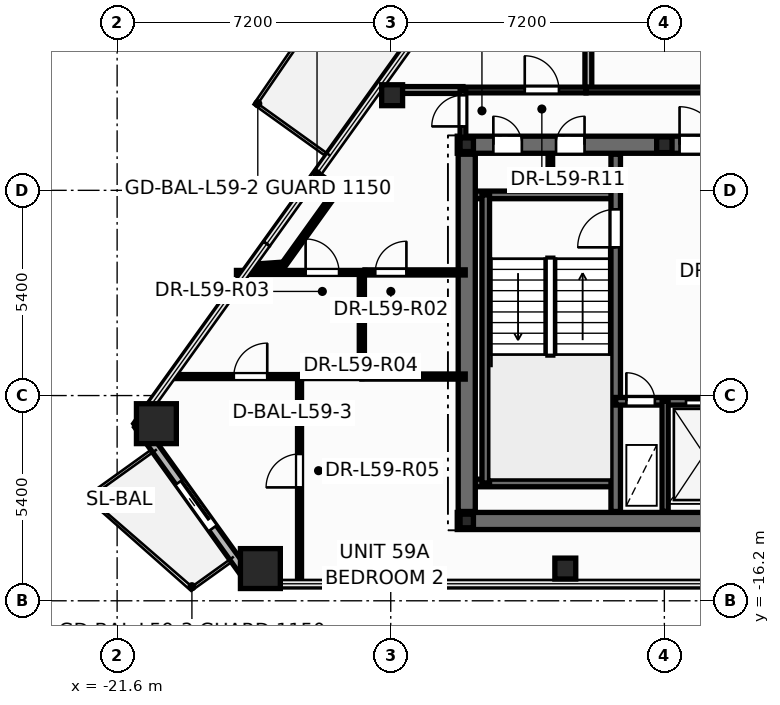
"""IFC4 building model, lengths in metres.
Left out: names, types, materials, properties, quantities, classifications, styles, units other than length and angle.
Written with IfcOpenShell. Run it as: python <this file> out.ifc"""

import sys

from ifc_helpers import new_model, si_unit, direction, frame, frame_2d, origin, origin_2d, place, context, subcontext, project, spatial, rectangle, hollow_rectangle, hollow_circle, i_section, extrude, element, fill, save


model = new_model("IFC4")
c1 = context("Model", 3, precision=1e-05, world=origin(), true_north=direction((0.0, 1.0)))
c2 = subcontext(c1, "Body", "Model", "MODEL_VIEW")
j1 = project(units=[si_unit("LENGTHUNIT", "METRE"), si_unit("PLANEANGLEUNIT", "RADIAN")], contexts=[c1])
p1 = place(None, origin())
s1 = spatial("IfcSite", under=j1, at=p1, CompositionType="ELEMENT")
p2 = place(p1, origin())
s2 = spatial("IfcBuilding", under=s1, at=p2, CompositionType="ELEMENT")
p3 = place(p2, frame((0.0, 0.0, 225.3)))
s3 = spatial("IfcBuildingStorey", under=s2, at=p3, CompositionType="ELEMENT", Elevation=225.3)
for number, where, z_axis, x_axis in (
    (1, (-20.567, -11.54, 0.0), (0.0, 0.0, 1.0), (1.0, 0.0, 0.0)),
    (2, (-17.83, -15.352, 0.0), (0.0, 0.0, 1.0), (1.0, 0.0, 0.0)),
):
    element("IfcColumn", number, at=place(p3, frame(where, z_axis=z_axis, x_axis=x_axis)), inside=s3, PredefinedType="COLUMN", context=c2, shape_type="SweptSolid", body=[
        extrude(hollow_rectangle(XDim=1.05, YDim=1.05, WallThickness=0.045, at=origin_2d()), origin(), (0.0, 0.0, 1.0), 3.6),
    ])
for number, where, z_axis, x_axis in (
    (3, (-9.807, -15.352, 0.0), (0.0, 0.0, 1.0), (1.0, 0.0, 0.0)),
    (4, (-14.363, -2.897, 0.0), (0.0, 0.0, 1.0), (1.0, 0.0, 0.0)),
):
    element("IfcColumn", number, at=place(p3, frame(where, z_axis=z_axis, x_axis=x_axis)), inside=s3, PredefinedType="COLUMN", context=c2, shape_type="SweptSolid", body=[
        extrude(hollow_circle(Radius=0.275, WallThickness=0.024, at=origin_2d()), origin(), (0.0, 0.0, 1.0), 3.6),
    ])
for number, where, z_axis, x_axis in (
    (5, (-12.4, -14.1, 0.0), (0.0, 0.0, 1.0), (1.0, 0.0, 0.0)),
    (6, (-12.4, -4.2, 0.0), (0.0, 0.0, 1.0), (1.0, 0.0, 0.0)),
):
    element("IfcColumn", number, at=place(p3, frame(where, z_axis=z_axis, x_axis=x_axis)), inside=s3, PredefinedType="COLUMN", context=c2, shape_type="SweptSolid", body=[
        extrude(i_section(OverallWidth=0.352, OverallDepth=0.359, WebThickness=0.018, FlangeThickness=0.026, at=origin_2d()), origin(), (0.0, 0.0, 1.0), 3.6),
    ])
p4 = place(p3, frame((-7.2, -4.2, 0.0), z_axis=(0.0, 0.0, 1.0), x_axis=(1.0, 0.0, 0.0)))
e7 = element("IfcColumn", 7, at=p4, inside=s3, PredefinedType="PILASTER", context=c2, shape_type="SweptSolid", body=[
    extrude(i_section(OverallWidth=0.405, OverallDepth=0.414, WebThickness=0.022, FlangeThickness=0.032, at=origin_2d()), origin(), (0.0, 0.0, 1.0), 3.6),
])
p5 = place(p3, frame((-21.036, -11.572, -0.015), z_axis=(0.0, 0.0, 1.0), x_axis=(0.583136392473, -0.812374265824, 0.0)))
e8 = element("IfcWall", 8, at=p5, inside=s3, PredefinedType="STANDARD", context=c2, shape_type="SweptSolid", body=[
    extrude(rectangle(XDim=5.106, YDim=0.24, at=frame_2d((2.553, 0.0))), origin(), (0.0, 0.0, 1.0), 2.853),
])
p6 = place(p5, frame((1.846, 0.0, 0.015)))
e9 = element("IfcOpeningElement", 9, at=p6, cuts=e8, PredefinedType="OPENING", context=c2, shape_type="SweptSolid", body=[
    extrude(rectangle(XDim=1.506, YDim=2.204, at=frame_2d((0.75, 1.102))), frame((0.0, 0.13, 0.0), z_axis=(0.0, -1.0, 0.0), x_axis=(1.0, 0.0, 0.0)), (0.0, 0.0, 1.0), 0.26),
])
p7 = place(p3, frame((-10.2, -5.52, 0.0), z_axis=(0.0, 0.0, 1.0), x_axis=(0.0, 1.0, 0.0)))
e10 = element("IfcWall", 10, at=p7, inside=s3, PredefinedType="PARTITIONING", context=c2, shape_type="SweptSolid", body=[
    extrude(rectangle(XDim=1.12, YDim=0.12, at=frame_2d((0.56, 0.0))), origin(), (0.0, 0.0, 1.0), 3.32),
])
p8 = place(p3, frame((-12.65, -14.1, 0.0), z_axis=(0.0, 0.0, 1.0), x_axis=(1.0, 0.0, 0.0)))
e11 = element("IfcWall", 11, at=p8, inside=s3, PredefinedType="SHEAR", context=c2, shape_type="SweptSolid", body=[
    extrude(rectangle(XDim=25.3, YDim=0.45, at=frame_2d((12.65, 0.0))), origin(), (0.0, 0.0, 1.0), 3.6),
])
p9 = place(p3, frame((-12.65, -4.2, 0.0), z_axis=(0.0, 0.0, 1.0), x_axis=(1.0, 0.0, 0.0)))
e12 = element("IfcWall", 12, at=p9, inside=s3, PredefinedType="SHEAR", context=c2, shape_type="SweptSolid", body=[
    extrude(rectangle(XDim=25.3, YDim=0.45, at=frame_2d((12.65, 0.0))), origin(), (0.0, 0.0, 1.0), 3.6),
])
p10 = place(p9, frame((0.95, 0.0, 0.0)))
e13 = element("IfcOpeningElement", 13, at=p10, cuts=e12, PredefinedType="OPENING", context=c2, shape_type="SweptSolid", body=[
    extrude(rectangle(XDim=0.756, YDim=2.054, at=frame_2d((0.375, 1.027))), frame((0.0, 0.235, 0.0), z_axis=(0.0, -1.0, 0.0), x_axis=(1.0, 0.0, 0.0)), (0.0, 0.0, 1.0), 0.47),
])
p11 = place(p9, frame((2.6, 0.0, 0.0)))
e14 = element("IfcOpeningElement", 14, at=p11, cuts=e12, PredefinedType="OPENING", context=c2, shape_type="SweptSolid", body=[
    extrude(rectangle(XDim=0.756, YDim=2.054, at=frame_2d((0.375, 1.027))), frame((0.0, 0.235, 0.0), z_axis=(0.0, -1.0, 0.0), x_axis=(1.0, 0.0, 0.0)), (0.0, 0.0, 1.0), 0.47),
])
p12 = place(p9, frame((21.85, 0.0, 0.0)))
e15 = element("IfcOpeningElement", 15, at=p12, cuts=e12, PredefinedType="OPENING", context=c2, shape_type="SweptSolid", body=[
    extrude(rectangle(XDim=0.756, YDim=2.054, at=frame_2d((0.375, 1.027))), frame((0.0, 0.235, 0.0), z_axis=(0.0, -1.0, 0.0), x_axis=(1.0, 0.0, 0.0)), (0.0, 0.0, 1.0), 0.47),
])
p13 = place(p9, frame((23.5, 0.0, 0.0)))
e16 = element("IfcOpeningElement", 16, at=p13, cuts=e12, PredefinedType="OPENING", context=c2, shape_type="SweptSolid", body=[
    extrude(rectangle(XDim=0.756, YDim=2.054, at=frame_2d((0.375, 1.027))), frame((0.0, 0.235, 0.0), z_axis=(0.0, -1.0, 0.0), x_axis=(1.0, 0.0, 0.0)), (0.0, 0.0, 1.0), 0.47),
])
p14 = place(p9, frame((5.85, 0.0, 0.0)))
e17 = element("IfcOpeningElement", 17, at=p14, cuts=e12, PredefinedType="OPENING", context=c2, shape_type="SweptSolid", body=[
    extrude(rectangle(XDim=1.006, YDim=2.104, at=frame_2d((0.5, 1.052))), frame((0.0, 0.235, 0.0), z_axis=(0.0, -1.0, 0.0), x_axis=(1.0, 0.0, 0.0)), (0.0, 0.0, 1.0), 0.47),
])
p15 = place(p9, frame((10.35, 0.0, 0.0)))
e18 = element("IfcOpeningElement", 18, at=p15, cuts=e12, PredefinedType="OPENING", context=c2, shape_type="SweptSolid", body=[
    extrude(rectangle(XDim=1.406, YDim=2.154, at=frame_2d((0.7, 1.077))), frame((0.0, 0.235, 0.0), z_axis=(0.0, -1.0, 0.0), x_axis=(1.0, 0.0, 0.0)), (0.0, 0.0, 1.0), 0.47),
])
p16 = place(p9, frame((18.45, 0.0, 0.0)))
e19 = element("IfcOpeningElement", 19, at=p16, cuts=e12, PredefinedType="OPENING", context=c2, shape_type="SweptSolid", body=[
    extrude(rectangle(XDim=1.006, YDim=2.104, at=frame_2d((0.5, 1.052))), frame((0.0, 0.235, 0.0), z_axis=(0.0, -1.0, 0.0), x_axis=(1.0, 0.0, 0.0)), (0.0, 0.0, 1.0), 0.47),
])
for number, where, z_axis, x_axis in (
    (20, (-12.35, -5.52, 0.0), (0.0, 0.0, 1.0), (1.0, 0.0, 0.0)),
    (21, (-12.35, -13.1, 0.0), (0.0, 0.0, 1.0), (1.0, 0.0, 0.0)),
):
    element("IfcWall", number, at=place(p3, frame(where, z_axis=z_axis, x_axis=x_axis)), inside=s3, PredefinedType="SOLIDWALL", context=c2, shape_type="SweptSolid", body=[
        extrude(rectangle(XDim=3.87, YDim=0.2, at=frame_2d((1.935, 0.0))), origin(), (0.0, 0.0, 1.0), 3.6),
    ])
p17 = place(p3, frame((-11.9, -13.1, 0.0), z_axis=(0.0, 0.0, 1.0), x_axis=(0.0, 1.0, 0.0)))
e22 = element("IfcWall", 22, at=p17, inside=s3, PredefinedType="SOLIDWALL", context=c2, shape_type="SweptSolid", body=[
    extrude(rectangle(XDim=7.58, YDim=0.2, at=frame_2d((3.79, 0.0))), origin(), (0.0, 0.0, 1.0), 3.6),
])
p18 = place(p3, frame((-8.48, -13.85, 0.0), z_axis=(0.0, 0.0, 1.0), x_axis=(0.0, 1.0, 0.0)))
e23 = element("IfcWall", 23, at=p18, inside=s3, PredefinedType="SHEAR", context=c2, shape_type="SweptSolid", body=[
    extrude(rectangle(XDim=9.4, YDim=0.25, at=frame_2d((4.7, 0.0))), origin(), (0.0, 0.0, 1.0), 3.6),
])
p19 = place(p18, frame((6.95, 0.0, 0.0)))
e24 = element("IfcOpeningElement", 24, at=p19, cuts=e23, PredefinedType="OPENING", context=c2, shape_type="SweptSolid", body=[
    extrude(rectangle(XDim=1.006, YDim=2.104, at=frame_2d((0.5, 1.052))), frame((0.0, 0.135, 0.0), z_axis=(0.0, -1.0, 0.0), x_axis=(1.0, 0.0, 0.0)), (0.0, 0.0, 1.0), 0.27),
])
p20 = place(p3, frame((-8.48, -10.95, 0.0), z_axis=(0.0, 0.0, 1.0), x_axis=(1.0, 0.0, 0.0)))
e25 = element("IfcWall", 25, at=p20, inside=s3, PredefinedType="SOLIDWALL", context=c2, shape_type="SweptSolid", body=[
    extrude(rectangle(XDim=3.36, YDim=0.2, at=frame_2d((1.68, 0.0))), origin(), (0.0, 0.0, 1.0), 3.6),
])
p21 = place(p20, frame((0.28, 0.0, 0.0)))
e26 = element("IfcOpeningElement", 26, at=p21, cuts=e25, PredefinedType="OPENING", context=c2, shape_type="SweptSolid", body=[
    extrude(rectangle(XDim=0.756, YDim=2.054, at=frame_2d((0.375, 1.027))), frame((0.0, 0.11, 0.0), z_axis=(0.0, -1.0, 0.0), x_axis=(1.0, 0.0, 0.0)), (0.0, 0.0, 1.0), 0.22),
])
p22 = place(p20, frame((1.85, 0.0, 0.0)))
e27 = element("IfcOpeningElement", 27, at=p22, cuts=e25, PredefinedType="OPENING", context=c2, shape_type="SweptSolid", body=[
    extrude(rectangle(XDim=1.106, YDim=2.104, at=frame_2d((0.55, 1.052))), frame((0.0, 0.11, 0.0), z_axis=(0.0, -1.0, 0.0), x_axis=(1.0, 0.0, 0.0)), (0.0, 0.0, 1.0), 0.22),
])
p23 = place(p3, frame((-7.18, -13.85, 0.0), z_axis=(0.0, 0.0, 1.0), x_axis=(0.0, 1.0, 0.0)))
e28 = element("IfcWall", 28, at=p23, inside=s3, PredefinedType="PARTITIONING", context=c2, shape_type="SweptSolid", body=[
    extrude(rectangle(XDim=2.9, YDim=0.16, at=frame_2d((1.45, 0.0))), origin(), (0.0, 0.0, 1.0), 2.545),
])
p24 = place(p3, frame((-12.4, -13.85, 0.0), z_axis=(0.0, 0.0, 1.0), x_axis=(0.0, 1.0, 0.0)))
e29 = element("IfcWall", 29, at=p24, inside=s3, PredefinedType="SHEAR", context=c2, shape_type="SweptSolid", body=[
    extrude(rectangle(XDim=9.4, YDim=0.45, at=frame_2d((4.7, 0.0))), origin(), (0.0, 0.0, 1.0), 3.6),
])
p25 = place(p3, frame((-9.2, -2.76, 0.0), z_axis=(0.0, 0.0, 1.0), x_axis=(0.0, 1.0, 0.0)))
e30 = element("IfcWall", 30, at=p25, inside=s3, PredefinedType="PARTITIONING", context=c2, shape_type="SweptSolid", body=[
    extrude(rectangle(XDim=7.742, YDim=0.18, at=frame_2d((3.871, 0.0))), origin(), (0.0, 0.0, 1.0), 2.595),
])
p26 = place(p3, frame((-16.8, -15.752, 0.0), z_axis=(0.0, 0.0, 1.0), x_axis=(0.0, 1.0, 0.0)))
e31 = element("IfcWall", 31, at=p26, inside=s3, PredefinedType="PARTITIONING", context=c2, shape_type="SweptSolid", body=[
    extrude(rectangle(XDim=5.452, YDim=0.105, at=frame_2d((2.726, 0.0))), origin(), (0.0, 0.0, 1.0), 2.838),
])
p27 = place(p26, frame((2.536, 0.0, 0.0)))
e32 = element("IfcOpeningElement", 32, at=p27, cuts=e31, PredefinedType="OPENING", context=c2, shape_type="SweptSolid", body=[
    extrude(rectangle(XDim=0.886, YDim=2.104, at=frame_2d((0.44, 1.052))), frame((0.0, 0.062, 0.0), z_axis=(0.0, -1.0, 0.0), x_axis=(1.0, 0.0, 0.0)), (0.0, 0.0, 1.0), 0.125),
])
p28 = place(p3, frame((-9.26, -2.76, 0.0), z_axis=(0.0, 0.0, 1.0), x_axis=(1.0, 0.0, 0.0)))
e33 = element("IfcWall", 33, at=p28, inside=s3, PredefinedType="PARTITIONING", context=c2, shape_type="SweptSolid", body=[
    extrude(rectangle(XDim=4.82, YDim=0.15, at=frame_2d((2.41, 0.0))), origin(), (0.0, 0.0, 1.0), 2.295),
])
p29 = place(p28, frame((3.52, 0.0, 0.0)))
e34 = element("IfcOpeningElement", 34, at=p29, cuts=e33, PredefinedType="OPENING", context=c2, shape_type="SweptSolid", body=[
    extrude(rectangle(XDim=0.906, YDim=2.104, at=frame_2d((0.45, 1.052))), frame((0.0, 0.085, 0.0), z_axis=(0.0, -1.0, 0.0), x_axis=(1.0, 0.0, 0.0)), (0.0, 0.0, 1.0), 0.17),
])
p30 = place(p3, frame((-20.169, -10.3, 0.0), z_axis=(0.0, 0.0, 1.0), x_axis=(1.0, 0.0, 0.0)))
e35 = element("IfcWall", 35, at=p30, inside=s3, PredefinedType="PARTITIONING", context=c2, shape_type="SweptSolid", body=[
    extrude(rectangle(XDim=3.429, YDim=0.105, at=frame_2d((1.715, 0.0))), origin(), (0.0, 0.0, 1.0), 2.295),
])
p31 = place(p30, frame((1.64, 0.0, 0.0)))
e36 = element("IfcOpeningElement", 36, at=p31, cuts=e35, PredefinedType="OPENING", context=c2, shape_type="SweptSolid", body=[
    extrude(rectangle(XDim=0.886, YDim=2.104, at=frame_2d((0.44, 1.052))), frame((0.0, 0.062, 0.0), z_axis=(0.0, -1.0, 0.0), x_axis=(1.0, 0.0, 0.0)), (0.0, 0.0, 1.0), 0.125),
])
p32 = place(p3, frame((-18.46, -7.56, 0.0), z_axis=(0.0, 0.0, 1.0), x_axis=(1.0, 0.0, 0.0)))
e37 = element("IfcWall", 37, at=p32, inside=s3, PredefinedType="PARTITIONING", context=c2, shape_type="SweptSolid", body=[
    extrude(rectangle(XDim=3.38, YDim=0.105, at=frame_2d((1.69, 0.0))), origin(), (0.0, 0.0, 1.0), 2.295),
])
p33 = place(p32, frame((1.82, 0.0, 0.0)))
e38 = element("IfcOpeningElement", 38, at=p33, cuts=e37, PredefinedType="OPENING", context=c2, shape_type="SweptSolid", body=[
    extrude(rectangle(XDim=0.886, YDim=2.104, at=frame_2d((0.44, 1.052))), frame((0.0, 0.062, 0.0), z_axis=(0.0, -1.0, 0.0), x_axis=(1.0, 0.0, 0.0)), (0.0, 0.0, 1.0), 0.125),
])
p34 = place(p3, frame((-12.5, -2.76, 0.0), z_axis=(0.0, 0.0, 1.0), x_axis=(1.0, 0.0, 0.0)))
e39 = element("IfcWall", 39, at=p34, inside=s3, PredefinedType="PARTITIONING", context=c2, shape_type="SweptSolid", body=[
    extrude(rectangle(XDim=3.238, YDim=0.15, at=frame_2d((1.619, 0.0))), origin(), (0.0, 0.0, 1.0), 3.32),
])
p35 = place(p34, frame((1.626, 0.0, 0.0)))
e40 = element("IfcOpeningElement", 40, at=p35, cuts=e39, PredefinedType="OPENING", context=c2, shape_type="SweptSolid", body=[
    extrude(rectangle(XDim=0.906, YDim=2.104, at=frame_2d((0.45, 1.052))), frame((0.0, 0.085, 0.0), z_axis=(0.0, -1.0, 0.0), x_axis=(1.0, 0.0, 0.0)), (0.0, 0.0, 1.0), 0.17),
])
p36 = place(p3, frame((-15.078, -7.56, 0.0), z_axis=(0.0, 0.0, 1.0), x_axis=(1.0, 0.0, 0.0)))
e41 = element("IfcWall", 41, at=p36, inside=s3, PredefinedType="PARTITIONING", context=c2, shape_type="SweptSolid", body=[
    extrude(rectangle(XDim=2.638, YDim=0.135, at=frame_2d((1.319, 0.0))), origin(), (0.0, 0.0, 1.0), 2.838),
])
p37 = place(p36, frame((0.271, 0.0, 0.0)))
e42 = element("IfcOpeningElement", 42, at=p37, cuts=e41, PredefinedType="OPENING", context=c2, shape_type="SweptSolid", body=[
    extrude(rectangle(XDim=0.826, YDim=2.104, at=frame_2d((0.41, 1.052))), frame((0.0, 0.078, 0.0), z_axis=(0.0, -1.0, 0.0), x_axis=(1.0, 0.0, 0.0)), (0.0, 0.0, 1.0), 0.155),
])
p38 = place(p3, frame((-15.16, -10.3, 0.0), z_axis=(0.0, 0.0, 1.0), x_axis=(0.0, 1.0, 0.0)))
e43 = element("IfcWall", 43, at=p38, inside=s3, PredefinedType="PARTITIONING", context=c2, shape_type="SweptSolid", body=[
    extrude(rectangle(XDim=2.74, YDim=0.135, at=frame_2d((1.37, 0.0))), origin(), (0.0, 0.0, 1.0), 3.32),
])
p39 = place(p3, frame((-15.16, -10.3, 0.0), z_axis=(0.0, 0.0, 1.0), x_axis=(1.0, 0.0, 0.0)))
e44 = element("IfcWall", 44, at=p39, inside=s3, PredefinedType="PARTITIONING", context=c2, shape_type="SweptSolid", body=[
    extrude(rectangle(XDim=2.72, YDim=0.135, at=frame_2d((1.36, 0.0))), origin(), (0.0, 0.0, 1.0), 2.838),
])
p40 = place(p3, frame((-15.801, -5.38, 0.0), z_axis=(0.0, 0.0, 1.0), x_axis=(-0.583201664134, -0.812327408716, 0.0)))
e45 = element("IfcWall", 45, at=p40, inside=s3, PredefinedType="PARTITIONING", context=c2, shape_type="SweptSolid", body=[
    extrude(rectangle(XDim=2.421, YDim=0.12, at=frame_2d((1.21, 0.0))), origin(), (0.0, 0.0, 1.0), 3.32),
])
p41 = place(p3, frame((-14.757, -2.76, 0.0), z_axis=(0.0, 0.0, 1.0), x_axis=(1.0, 0.0, 0.0)))
e46 = element("IfcWall", 46, at=p41, inside=s3, PredefinedType="PARTITIONING", context=c2, shape_type="SweptSolid", body=[
    extrude(rectangle(XDim=2.257, YDim=0.18, at=frame_2d((1.129, 0.0))), origin(), (0.0, 0.0, 1.0), 2.595),
])
p42 = place(p3, frame((-16.738, -10.3, 0.0), z_axis=(0.0, 0.0, 1.0), x_axis=(1.0, 0.0, 0.0)))
e47 = element("IfcWall", 47, at=p42, inside=s3, PredefinedType="PARTITIONING", context=c2, shape_type="SweptSolid", body=[
    extrude(rectangle(XDim=1.578, YDim=0.105, at=frame_2d((0.789, 0.0))), origin(), (0.0, 0.0, 1.0), 3.32),
])
p43 = place(p3, frame((-12.5, -4.24, 0.0), z_axis=(0.0, 0.0, 1.0), x_axis=(0.0, 1.0, 0.0)))
e48 = element("IfcWall", 48, at=p43, inside=s3, PredefinedType="PARTITIONING", context=c2, shape_type="SweptSolid", body=[
    extrude(rectangle(XDim=1.48, YDim=0.15, at=frame_2d((0.74, 0.0))), origin(), (0.0, 0.0, 1.0), 2.295),
])
p44 = place(p43, frame((0.522, 0.0, 0.0)))
e49 = element("IfcOpeningElement", 49, at=p44, cuts=e48, PredefinedType="OPENING", context=c2, shape_type="SweptSolid", body=[
    extrude(rectangle(XDim=0.826, YDim=2.104, at=frame_2d((0.41, 1.052))), frame((0.0, 0.085, 0.0), z_axis=(0.0, -1.0, 0.0), x_axis=(1.0, 0.0, 0.0)), (0.0, 0.0, 1.0), 0.17),
])
p45 = place(p3, frame((-17.213, -7.347, 0.0), z_axis=(0.0, 0.0, 1.0), x_axis=(-0.997593647417, -0.069331916407, 0.0)))
e50 = element("IfcWall", 50, at=p45, inside=s3, PredefinedType="PARTITIONING", context=c2, shape_type="SweptSolid", body=[
    extrude(rectangle(XDim=0.87, YDim=0.12, at=frame_2d((0.435, 0.0))), origin(), (0.0, 0.0, 1.0), 2.838),
])
p46 = place(p3, frame((-16.345, -4.99, 0.0), z_axis=(0.0, 0.0, 1.0), x_axis=(0.812328158573, -0.583200619675, 0.0)))
e51 = element("IfcWall", 51, at=p46, inside=s3, PredefinedType="PARTITIONING", context=c2, shape_type="SweptSolid", body=[
    extrude(rectangle(XDim=0.67, YDim=0.12, at=frame_2d((0.335, 0.0))), origin(), (0.0, 0.0, 1.0), 2.838),
])
p47 = place(p6, origin())
e52 = element("IfcDoor", 52, at=p47, inside=s3, OperationType="SLIDING_TO_RIGHT", PredefinedType="DOOR", context=c2, shape_type="SweptSolid", body=[
    extrude(rectangle(XDim=1.5, YDim=2.2, at=frame_2d((0.75, 1.1))), frame((0.0, 0.025, 0.0), z_axis=(0.0, -1.0, 0.0), x_axis=(1.0, 0.0, 0.0)), (0.0, 0.0, 1.0), 0.05),
])
fill(e9, e52)
p48 = place(p19, origin())
e53 = element("IfcDoor", 53, at=p48, inside=s3, OperationType="SINGLE_SWING_LEFT", PredefinedType="DOOR", context=c2, shape_type="SweptSolid", body=[
    extrude(rectangle(XDim=1.0, YDim=2.1, at=frame_2d((0.5, 1.05))), frame((0.0, 0.025, 0.0), z_axis=(0.0, -1.0, 0.0), x_axis=(1.0, 0.0, 0.0)), (0.0, 0.0, 1.0), 0.05),
])
fill(e24, e53)
p49 = place(p21, origin())
e54 = element("IfcDoor", 54, at=p49, inside=s3, OperationType="SINGLE_SWING_LEFT", PredefinedType="DOOR", context=c2, shape_type="SweptSolid", body=[
    extrude(rectangle(XDim=0.75, YDim=2.05, at=frame_2d((0.375, 1.025))), frame((0.0, 0.025, 0.0), z_axis=(0.0, -1.0, 0.0), x_axis=(1.0, 0.0, 0.0)), (0.0, 0.0, 1.0), 0.05),
])
fill(e26, e54)
p50 = place(p22, origin())
e55 = element("IfcDoor", 55, at=p50, inside=s3, OperationType="DOUBLE_DOOR_SLIDING", PredefinedType="DOOR", context=c2, shape_type="SweptSolid", body=[
    extrude(rectangle(XDim=1.1, YDim=2.1, at=frame_2d((0.55, 1.05))), frame((0.0, 0.025, 0.0), z_axis=(0.0, -1.0, 0.0), x_axis=(1.0, 0.0, 0.0)), (0.0, 0.0, 1.0), 0.05),
])
fill(e27, e55)
p51 = place(p10, origin())
e56 = element("IfcDoor", 56, at=p51, inside=s3, OperationType="SINGLE_SWING_LEFT", PredefinedType="DOOR", context=c2, shape_type="SweptSolid", body=[
    extrude(rectangle(XDim=0.75, YDim=2.05, at=frame_2d((0.375, 1.025))), frame((0.0, 0.025, 0.0), z_axis=(0.0, -1.0, 0.0), x_axis=(1.0, 0.0, 0.0)), (0.0, 0.0, 1.0), 0.05),
])
fill(e13, e56)
p52 = place(p11, origin())
e57 = element("IfcDoor", 57, at=p52, inside=s3, OperationType="SINGLE_SWING_RIGHT", PredefinedType="DOOR", context=c2, shape_type="SweptSolid", body=[
    extrude(rectangle(XDim=0.75, YDim=2.05, at=frame_2d((0.375, 1.025))), frame((0.0, 0.025, 0.0), z_axis=(0.0, -1.0, 0.0), x_axis=(1.0, 0.0, 0.0)), (0.0, 0.0, 1.0), 0.05),
])
fill(e14, e57)
p53 = place(p14, origin())
e58 = element("IfcDoor", 58, at=p53, inside=s3, OperationType="SINGLE_SWING_LEFT", PredefinedType="DOOR", context=c2, shape_type="SweptSolid", body=[
    extrude(rectangle(XDim=1.0, YDim=2.1, at=frame_2d((0.5, 1.05))), frame((0.0, 0.025, 0.0), z_axis=(0.0, -1.0, 0.0), x_axis=(1.0, 0.0, 0.0)), (0.0, 0.0, 1.0), 0.05),
])
fill(e17, e58)
p54 = place(p44, origin())
e59 = element("IfcDoor", 59, at=p54, inside=s3, OperationType="SINGLE_SWING_LEFT", PredefinedType="DOOR", context=c2, shape_type="SweptSolid", body=[
    extrude(rectangle(XDim=0.82, YDim=2.1, at=frame_2d((0.41, 1.05))), frame((0.0, 0.025, 0.0), z_axis=(0.0, -1.0, 0.0), x_axis=(1.0, 0.0, 0.0)), (0.0, 0.0, 1.0), 0.05),
])
fill(e49, e59)
p55 = place(p37, origin())
e60 = element("IfcDoor", 60, at=p55, inside=s3, OperationType="SINGLE_SWING_RIGHT", PredefinedType="DOOR", context=c2, shape_type="SweptSolid", body=[
    extrude(rectangle(XDim=0.82, YDim=2.1, at=frame_2d((0.41, 1.05))), frame((0.0, 0.025, 0.0), z_axis=(0.0, -1.0, 0.0), x_axis=(1.0, 0.0, 0.0)), (0.0, 0.0, 1.0), 0.05),
])
fill(e42, e60)
p56 = place(p33, origin())
e61 = element("IfcDoor", 61, at=p56, inside=s3, OperationType="SINGLE_SWING_LEFT", PredefinedType="DOOR", context=c2, shape_type="SweptSolid", body=[
    extrude(rectangle(XDim=0.88, YDim=2.1, at=frame_2d((0.44, 1.05))), frame((0.0, 0.025, 0.0), z_axis=(0.0, -1.0, 0.0), x_axis=(1.0, 0.0, 0.0)), (0.0, 0.0, 1.0), 0.05),
])
fill(e38, e61)
p57 = place(p31, origin())
e62 = element("IfcDoor", 62, at=p57, inside=s3, OperationType="SINGLE_SWING_RIGHT", PredefinedType="DOOR", context=c2, shape_type="SweptSolid", body=[
    extrude(rectangle(XDim=0.88, YDim=2.1, at=frame_2d((0.44, 1.05))), frame((0.0, 0.025, 0.0), z_axis=(0.0, -1.0, 0.0), x_axis=(1.0, 0.0, 0.0)), (0.0, 0.0, 1.0), 0.05),
])
fill(e36, e62)
p58 = place(p27, origin())
e63 = element("IfcDoor", 63, at=p58, inside=s3, OperationType="SINGLE_SWING_LEFT", PredefinedType="DOOR", context=c2, shape_type="SweptSolid", body=[
    extrude(rectangle(XDim=0.88, YDim=2.1, at=frame_2d((0.44, 1.05))), frame((0.0, 0.025, 0.0), z_axis=(0.0, -1.0, 0.0), x_axis=(1.0, 0.0, 0.0)), (0.0, 0.0, 1.0), 0.05),
])
fill(e32, e63)
p59 = place(p35, origin())
e64 = element("IfcDoor", 64, at=p59, inside=s3, OperationType="SINGLE_SWING_LEFT", PredefinedType="DOOR", context=c2, shape_type="SweptSolid", body=[
    extrude(rectangle(XDim=0.9, YDim=2.1, at=frame_2d((0.45, 1.05))), frame((0.0, 0.025, 0.0), z_axis=(0.0, -1.0, 0.0), x_axis=(1.0, 0.0, 0.0)), (0.0, 0.0, 1.0), 0.05),
])
fill(e40, e64)
save(model, sys.argv[1])
